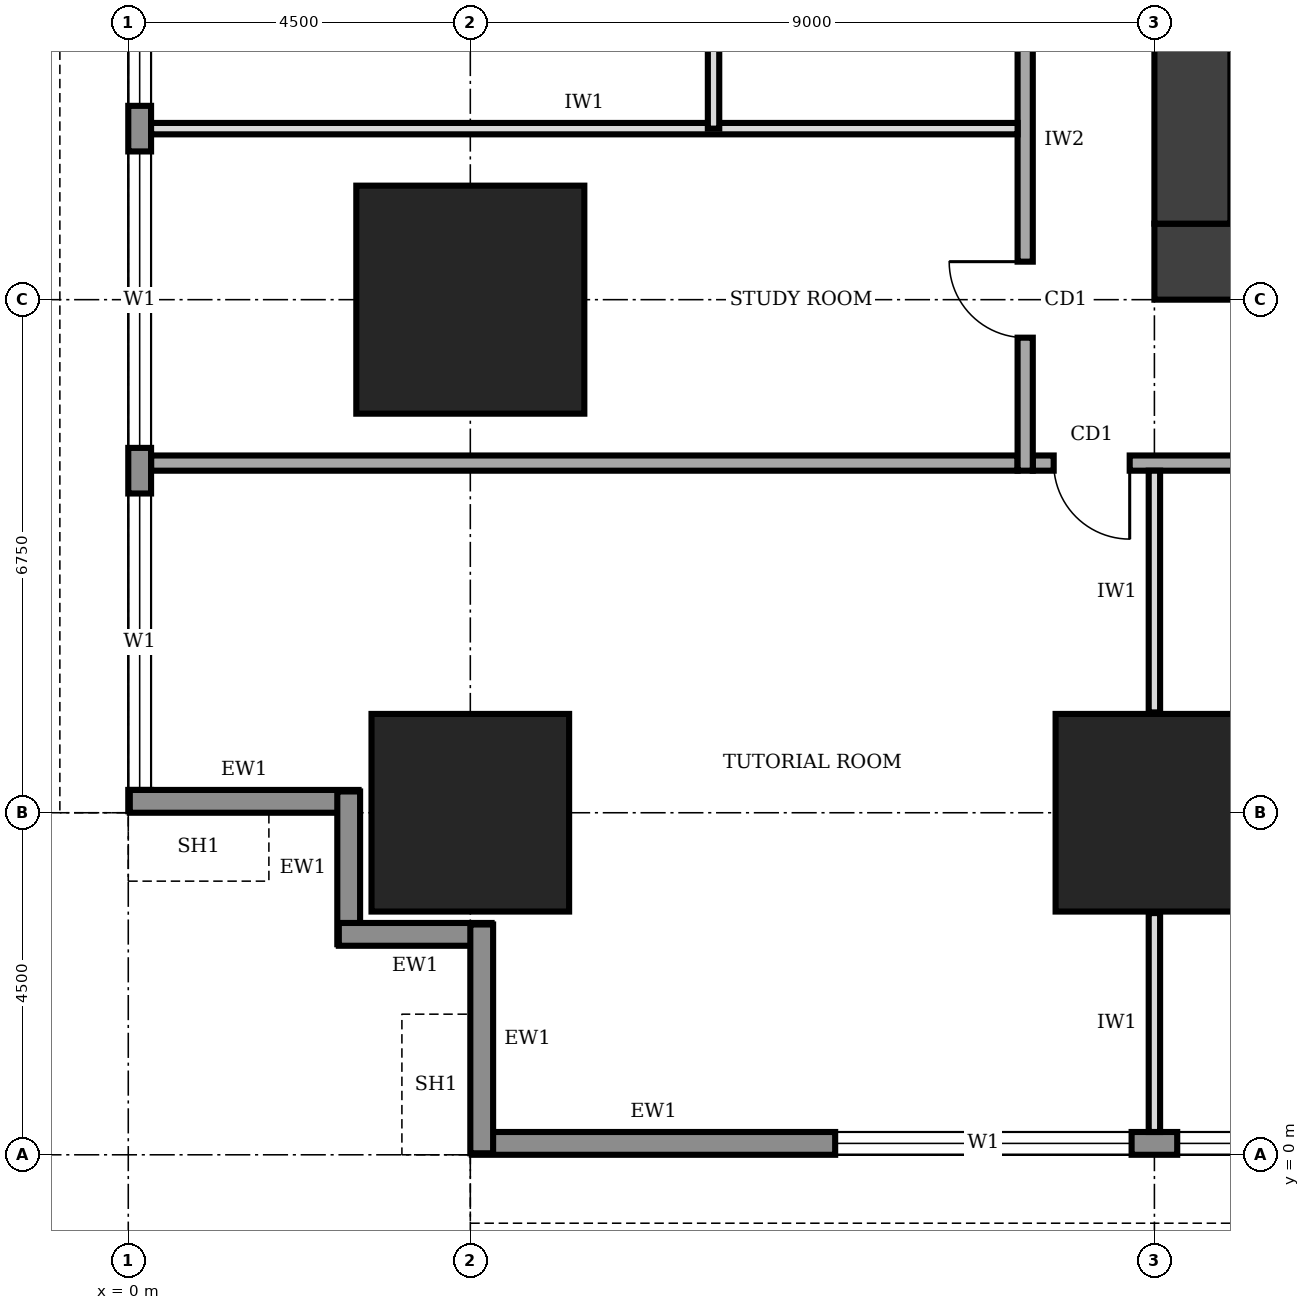
"""IFC4 building model, lengths in metres.
Left out: names, types, materials, properties, quantities, classifications, styles, units other than length and angle.
Written with IfcOpenShell. Run it as: python <this file> out.ifc"""

import sys

from ifc_helpers import new_model, si_unit, direction, frame, frame_2d, origin, origin_2d, place, context, subcontext, project, spatial, rectangle, extrude, element, fill, save


model = new_model("IFC4")
c1 = context("Model", 3, precision=1e-05, world=origin(), true_north=direction((0.0, 1.0)))
c2 = subcontext(c1, "Body", "Model", "MODEL_VIEW")
j1 = project(units=[si_unit("LENGTHUNIT", "METRE"), si_unit("PLANEANGLEUNIT", "RADIAN")], contexts=[c1])
p1 = place(None, origin())
s1 = spatial("IfcSite", under=j1, at=p1, CompositionType="ELEMENT")
p2 = place(p1, origin())
s2 = spatial("IfcBuilding", under=s1, at=p2, CompositionType="ELEMENT")
p3 = place(p2, frame((0.0, 0.0, 37.0)))
s3 = spatial("IfcBuildingStorey", under=s2, at=p3, CompositionType="ELEMENT", Elevation=37.0)
p4 = place(p3, frame((13.5, 11.75, 0.0), z_axis=(0.0, 0.0, 1.0), x_axis=(1.0, 0.0, 0.0)))
e1 = element("IfcWall", 1, at=p4, inside=s3, PredefinedType="SHEAR", context=c2, shape_type="SweptSolid", body=[
    extrude(rectangle(XDim=13.5, YDim=1.0, at=frame_2d((6.75, 0.0))), origin(), (0.0, 0.0, 1.0), 4.0),
])
p5 = place(p4, frame((4.75, 0.0, 0.0)))
e2 = element("IfcOpeningElement", 2, at=p5, cuts=e1, PredefinedType="OPENING", context=c2, shape_type="SweptSolid", body=[
    extrude(rectangle(XDim=1.0, YDim=2.1, at=frame_2d((0.5, 1.05))), frame((0.0, 0.51, 0.0), z_axis=(0.0, -1.0, 0.0), x_axis=(1.0, 0.0, 0.0)), (0.0, 0.0, 1.0), 1.02),
])
p6 = place(p3, frame((14.0, 28.25, 0.0), z_axis=(0.0, 0.0, 1.0), x_axis=(0.0, -1.0, 0.0)))
e3 = element("IfcWall", 3, at=p6, inside=s3, PredefinedType="SHEAR", context=c2, shape_type="SweptSolid", body=[
    extrude(rectangle(XDim=16.0, YDim=1.0, at=frame_2d((8.0, 0.0))), origin(), (0.0, 0.0, 1.0), 4.0),
])
for number, where, z_axis, x_axis in (
    (4, (4.5, 4.5, 0.0), (0.0, 0.0, 1.0), (1.0, 0.0, 0.0)),
    (5, (13.5, 4.5, 0.0), (0.0, 0.0, 1.0), (1.0, 0.0, 0.0)),
):
    element("IfcColumn", number, at=place(p3, frame(where, z_axis=z_axis, x_axis=x_axis)), inside=s3, PredefinedType="COLUMN", context=c2, shape_type="SweptSolid", body=[
        extrude(rectangle(XDim=2.6, YDim=2.6, at=origin_2d()), origin(), (0.0, 0.0, 1.0), 4.0),
    ])
p7 = place(p3, frame((4.5, 11.25, 0.0), z_axis=(0.0, 0.0, 1.0), x_axis=(1.0, 0.0, 0.0)))
e6 = element("IfcColumn", 6, at=p7, inside=s3, PredefinedType="COLUMN", context=c2, shape_type="SweptSolid", body=[
    extrude(rectangle(XDim=3.0, YDim=3.0, at=origin_2d()), origin(), (0.0, 0.0, 1.0), 4.0),
])
p8 = place(p3, frame((4.52, 0.15, 0.0), z_axis=(0.0, 0.0, 1.0), x_axis=(1.0, 0.0, 0.0)))
e7 = element("IfcWall", 7, at=p8, inside=s3, PredefinedType="STANDARD", context=c2, shape_type="SweptSolid", body=[
    extrude(rectangle(XDim=31.46, YDim=0.3, at=frame_2d((15.73, 0.0))), origin(), (0.0, 0.0, 1.0), 3.75),
])
p9 = place(p8, frame((4.78, 0.0, 0.9)))
e8 = element("IfcOpeningElement", 8, at=p9, cuts=e7, PredefinedType="OPENING", context=c2, shape_type="SweptSolid", body=[
    extrude(rectangle(XDim=3.9, YDim=2.2, at=frame_2d((1.95, 1.1))), frame((0.0, 0.16, 0.0), z_axis=(0.0, -1.0, 0.0), x_axis=(1.0, 0.0, 0.0)), (0.0, 0.0, 1.0), 0.32),
])
p10 = place(p8, frame((9.28, 0.0, 0.9)))
e9 = element("IfcOpeningElement", 9, at=p10, cuts=e7, PredefinedType="OPENING", context=c2, shape_type="SweptSolid", body=[
    extrude(rectangle(XDim=3.9, YDim=2.2, at=frame_2d((1.95, 1.1))), frame((0.0, 0.16, 0.0), z_axis=(0.0, -1.0, 0.0), x_axis=(1.0, 0.0, 0.0)), (0.0, 0.0, 1.0), 0.32),
])
p11 = place(p8, frame((13.78, 0.0, 0.9)))
e10 = element("IfcOpeningElement", 10, at=p11, cuts=e7, PredefinedType="OPENING", context=c2, shape_type="SweptSolid", body=[
    extrude(rectangle(XDim=3.9, YDim=2.2, at=frame_2d((1.95, 1.1))), frame((0.0, 0.16, 0.0), z_axis=(0.0, -1.0, 0.0), x_axis=(1.0, 0.0, 0.0)), (0.0, 0.0, 1.0), 0.32),
])
p12 = place(p8, frame((18.28, 0.0, 0.9)))
e11 = element("IfcOpeningElement", 11, at=p12, cuts=e7, PredefinedType="OPENING", context=c2, shape_type="SweptSolid", body=[
    extrude(rectangle(XDim=3.9, YDim=2.2, at=frame_2d((1.95, 1.1))), frame((0.0, 0.16, 0.0), z_axis=(0.0, -1.0, 0.0), x_axis=(1.0, 0.0, 0.0)), (0.0, 0.0, 1.0), 0.32),
])
p13 = place(p8, frame((22.78, 0.0, 0.9)))
e12 = element("IfcOpeningElement", 12, at=p13, cuts=e7, PredefinedType="OPENING", context=c2, shape_type="SweptSolid", body=[
    extrude(rectangle(XDim=3.9, YDim=2.2, at=frame_2d((1.95, 1.1))), frame((0.0, 0.16, 0.0), z_axis=(0.0, -1.0, 0.0), x_axis=(1.0, 0.0, 0.0)), (0.0, 0.0, 1.0), 0.32),
])
p14 = place(p8, frame((27.28, 0.0, 0.9)))
e13 = element("IfcOpeningElement", 13, at=p14, cuts=e7, PredefinedType="OPENING", context=c2, shape_type="SweptSolid", body=[
    extrude(rectangle(XDim=3.9, YDim=2.2, at=frame_2d((1.95, 1.1))), frame((0.0, 0.16, 0.0), z_axis=(0.0, -1.0, 0.0), x_axis=(1.0, 0.0, 0.0)), (0.0, 0.0, 1.0), 0.32),
])
p15 = place(p3, frame((0.15, 35.98, 0.0), z_axis=(0.0, 0.0, 1.0), x_axis=(0.0, -1.0, 0.0)))
e14 = element("IfcWall", 14, at=p15, inside=s3, PredefinedType="STANDARD", context=c2, shape_type="SweptSolid", body=[
    extrude(rectangle(XDim=31.46, YDim=0.3, at=frame_2d((15.73, 0.0))), origin(), (0.0, 0.0, 1.0), 3.75),
])
p16 = place(p15, frame((27.28, 0.0, 0.9)))
e15 = element("IfcOpeningElement", 15, at=p16, cuts=e14, PredefinedType="OPENING", context=c2, shape_type="SweptSolid", body=[
    extrude(rectangle(XDim=3.9, YDim=2.2, at=frame_2d((1.95, 1.1))), frame((0.0, 0.16, 0.0), z_axis=(0.0, -1.0, 0.0), x_axis=(1.0, 0.0, 0.0)), (0.0, 0.0, 1.0), 0.32),
])
p17 = place(p15, frame((22.78, 0.0, 0.9)))
e16 = element("IfcOpeningElement", 16, at=p17, cuts=e14, PredefinedType="OPENING", context=c2, shape_type="SweptSolid", body=[
    extrude(rectangle(XDim=3.9, YDim=2.2, at=frame_2d((1.95, 1.1))), frame((0.0, 0.16, 0.0), z_axis=(0.0, -1.0, 0.0), x_axis=(1.0, 0.0, 0.0)), (0.0, 0.0, 1.0), 0.32),
])
p18 = place(p15, frame((18.28, 0.0, 0.9)))
e17 = element("IfcOpeningElement", 17, at=p18, cuts=e14, PredefinedType="OPENING", context=c2, shape_type="SweptSolid", body=[
    extrude(rectangle(XDim=3.9, YDim=2.2, at=frame_2d((1.95, 1.1))), frame((0.0, 0.16, 0.0), z_axis=(0.0, -1.0, 0.0), x_axis=(1.0, 0.0, 0.0)), (0.0, 0.0, 1.0), 0.32),
])
p19 = place(p15, frame((13.78, 0.0, 0.9)))
e18 = element("IfcOpeningElement", 18, at=p19, cuts=e14, PredefinedType="OPENING", context=c2, shape_type="SweptSolid", body=[
    extrude(rectangle(XDim=3.9, YDim=2.2, at=frame_2d((1.95, 1.1))), frame((0.0, 0.16, 0.0), z_axis=(0.0, -1.0, 0.0), x_axis=(1.0, 0.0, 0.0)), (0.0, 0.0, 1.0), 0.32),
])
p20 = place(p15, frame((9.28, 0.0, 0.9)))
e19 = element("IfcOpeningElement", 19, at=p20, cuts=e14, PredefinedType="OPENING", context=c2, shape_type="SweptSolid", body=[
    extrude(rectangle(XDim=3.9, YDim=2.2, at=frame_2d((1.95, 1.1))), frame((0.0, 0.16, 0.0), z_axis=(0.0, -1.0, 0.0), x_axis=(1.0, 0.0, 0.0)), (0.0, 0.0, 1.0), 0.32),
])
p21 = place(p15, frame((4.78, 0.0, 0.9)))
e20 = element("IfcOpeningElement", 20, at=p21, cuts=e14, PredefinedType="OPENING", context=c2, shape_type="SweptSolid", body=[
    extrude(rectangle(XDim=3.9, YDim=2.2, at=frame_2d((1.95, 1.1))), frame((0.0, 0.16, 0.0), z_axis=(0.0, -1.0, 0.0), x_axis=(1.0, 0.0, 0.0)), (0.0, 0.0, 1.0), 0.32),
])
p22 = place(p3, frame((0.02, 4.65, 0.0), z_axis=(0.0, 0.0, 1.0), x_axis=(1.0, 0.0, 0.0)))
e21 = element("IfcWall", 21, at=p22, inside=s3, PredefinedType="STANDARD", context=c2, shape_type="SweptSolid", body=[
    extrude(rectangle(XDim=3.01, YDim=0.3, at=frame_2d((1.505, 0.0))), origin(), (0.0, 0.0, 1.0), 2.85),
])
for number, where, z_axis, x_axis in (
    (22, (2.9, 4.78, 0.0), (0.0, 0.0, 1.0), (0.0, -1.0, 0.0)),
    (23, (2.77, 2.9, 0.0), (0.0, 0.0, 1.0), (1.0, 0.0, 0.0)),
):
    element("IfcWall", number, at=place(p3, frame(where, z_axis=z_axis, x_axis=x_axis)), inside=s3, PredefinedType="STANDARD", context=c2, shape_type="SweptSolid", body=[
        extrude(rectangle(XDim=2.01, YDim=0.3, at=frame_2d((1.005, 0.0))), origin(), (0.0, 0.0, 1.0), 3.75),
    ])
p23 = place(p3, frame((4.65, 3.03, 0.0), z_axis=(0.0, 0.0, 1.0), x_axis=(0.0, -1.0, 0.0)))
e24 = element("IfcWall", 24, at=p23, inside=s3, PredefinedType="STANDARD", context=c2, shape_type="SweptSolid", body=[
    extrude(rectangle(XDim=3.01, YDim=0.3, at=frame_2d((1.505, 0.0))), origin(), (0.0, 0.0, 1.0), 2.85),
])
p24 = place(p3, frame((11.9, 9.1, 0.0), z_axis=(0.0, 0.0, 1.0), x_axis=(1.0, 0.0, 0.0)))
e25 = element("IfcWall", 25, at=p24, inside=s3, PredefinedType="SOLIDWALL", context=c2, shape_type="SweptSolid", body=[
    extrude(rectangle(XDim=18.4, YDim=0.2, at=frame_2d((9.2, 0.0))), origin(), (0.0, 0.0, 1.0), 3.75),
])
p25 = place(p24, frame((0.275, 0.0, 0.0)))
e26 = element("IfcOpeningElement", 26, at=p25, cuts=e25, PredefinedType="OPENING", context=c2, shape_type="SweptSolid", body=[
    extrude(rectangle(XDim=1.0, YDim=2.1, at=frame_2d((0.5, 1.05))), frame((0.0, 0.11, 0.0), z_axis=(0.0, -1.0, 0.0), x_axis=(1.0, 0.0, 0.0)), (0.0, 0.0, 1.0), 0.22),
])
p26 = place(p24, frame((3.35, 0.0, 0.0)))
e27 = element("IfcOpeningElement", 27, at=p26, cuts=e25, PredefinedType="OPENING", context=c2, shape_type="SweptSolid", body=[
    extrude(rectangle(XDim=1.0, YDim=2.1, at=frame_2d((0.5, 1.05))), frame((0.0, 0.11, 0.0), z_axis=(0.0, -1.0, 0.0), x_axis=(1.0, 0.0, 0.0)), (0.0, 0.0, 1.0), 0.22),
])
p27 = place(p24, frame((10.1, 0.0, 0.0)))
e28 = element("IfcOpeningElement", 28, at=p27, cuts=e25, PredefinedType="OPENING", context=c2, shape_type="SweptSolid", body=[
    extrude(rectangle(XDim=1.0, YDim=2.1, at=frame_2d((0.5, 1.05))), frame((0.0, 0.11, 0.0), z_axis=(0.0, -1.0, 0.0), x_axis=(1.0, 0.0, 0.0)), (0.0, 0.0, 1.0), 0.22),
])
p28 = place(p24, frame((15.85, 0.0, 0.0)))
e29 = element("IfcOpeningElement", 29, at=p28, cuts=e25, PredefinedType="OPENING", context=c2, shape_type="SweptSolid", body=[
    extrude(rectangle(XDim=1.8, YDim=2.1, at=frame_2d((0.9, 1.05))), frame((0.0, 0.11, 0.0), z_axis=(0.0, -1.0, 0.0), x_axis=(1.0, 0.0, 0.0)), (0.0, 0.0, 1.0), 0.22),
])
p29 = place(p3, frame((11.8, 31.3, 0.0), z_axis=(0.0, 0.0, 1.0), x_axis=(0.0, -1.0, 0.0)))
e30 = element("IfcWall", 30, at=p29, inside=s3, PredefinedType="SOLIDWALL", context=c2, shape_type="SweptSolid", body=[
    extrude(rectangle(XDim=22.3, YDim=0.2, at=frame_2d((11.15, 0.0))), origin(), (0.0, 0.0, 1.0), 3.75),
])
p30 = place(p29, frame((19.55, 0.0, 0.0)))
e31 = element("IfcOpeningElement", 31, at=p30, cuts=e30, PredefinedType="OPENING", context=c2, shape_type="SweptSolid", body=[
    extrude(rectangle(XDim=1.0, YDim=2.1, at=frame_2d((0.5, 1.05))), frame((0.0, 0.11, 0.0), z_axis=(0.0, -1.0, 0.0), x_axis=(1.0, 0.0, 0.0)), (0.0, 0.0, 1.0), 0.22),
])
p31 = place(p29, frame((15.45, 0.0, 0.0)))
e32 = element("IfcOpeningElement", 32, at=p31, cuts=e30, PredefinedType="OPENING", context=c2, shape_type="SweptSolid", body=[
    extrude(rectangle(XDim=0.9, YDim=2.1, at=frame_2d((0.45, 1.05))), frame((0.0, 0.11, 0.0), z_axis=(0.0, -1.0, 0.0), x_axis=(1.0, 0.0, 0.0)), (0.0, 0.0, 1.0), 0.22),
])
p32 = place(p29, frame((12.45, 0.0, 0.0)))
e33 = element("IfcOpeningElement", 33, at=p32, cuts=e30, PredefinedType="OPENING", context=c2, shape_type="SweptSolid", body=[
    extrude(rectangle(XDim=0.9, YDim=2.1, at=frame_2d((0.45, 1.05))), frame((0.0, 0.11, 0.0), z_axis=(0.0, -1.0, 0.0), x_axis=(1.0, 0.0, 0.0)), (0.0, 0.0, 1.0), 0.22),
])
p33 = place(p29, frame((7.6, 0.0, 0.0)))
e34 = element("IfcOpeningElement", 34, at=p33, cuts=e30, PredefinedType="OPENING", context=c2, shape_type="SweptSolid", body=[
    extrude(rectangle(XDim=0.9, YDim=2.1, at=frame_2d((0.45, 1.05))), frame((0.0, 0.11, 0.0), z_axis=(0.0, -1.0, 0.0), x_axis=(1.0, 0.0, 0.0)), (0.0, 0.0, 1.0), 0.22),
])
p34 = place(p29, frame((4.8, 0.0, 0.0)))
e35 = element("IfcOpeningElement", 35, at=p34, cuts=e30, PredefinedType="OPENING", context=c2, shape_type="SweptSolid", body=[
    extrude(rectangle(XDim=1.0, YDim=2.1, at=frame_2d((0.5, 1.05))), frame((0.0, 0.11, 0.0), z_axis=(0.0, -1.0, 0.0), x_axis=(1.0, 0.0, 0.0)), (0.0, 0.0, 1.0), 0.22),
])
p35 = place(p29, frame((10.3, 0.0, 0.0)))
e36 = element("IfcOpeningElement", 36, at=p35, cuts=e30, PredefinedType="OPENING", context=c2, shape_type="SweptSolid", body=[
    extrude(rectangle(XDim=1.0, YDim=2.1, at=frame_2d((0.5, 1.05))), frame((0.0, 0.11, 0.0), z_axis=(0.0, -1.0, 0.0), x_axis=(1.0, 0.0, 0.0)), (0.0, 0.0, 1.0), 0.22),
])
p36 = place(p29, frame((1.55, 0.0, 0.0)))
e37 = element("IfcOpeningElement", 37, at=p36, cuts=e30, PredefinedType="OPENING", context=c2, shape_type="SweptSolid", body=[
    extrude(rectangle(XDim=1.0, YDim=2.1, at=frame_2d((0.5, 1.05))), frame((0.0, 0.11, 0.0), z_axis=(0.0, -1.0, 0.0), x_axis=(1.0, 0.0, 0.0)), (0.0, 0.0, 1.0), 0.22),
])
p37 = place(p3, frame((0.3, 9.1, 0.0), z_axis=(0.0, 0.0, 1.0), x_axis=(1.0, 0.0, 0.0)))
e38 = element("IfcWall", 38, at=p37, inside=s3, PredefinedType="SOLIDWALL", context=c2, shape_type="SweptSolid", body=[
    extrude(rectangle(XDim=11.4, YDim=0.2, at=frame_2d((5.7, 0.0))), origin(), (0.0, 0.0, 1.0), 3.75),
])
p38 = place(p3, frame((13.5, 0.3, 0.0), z_axis=(0.0, 0.0, 1.0), x_axis=(0.0, 1.0, 0.0)))
e39 = element("IfcWall", 39, at=p38, inside=s3, PredefinedType="PARTITIONING", context=c2, shape_type="SweptSolid", body=[
    extrude(rectangle(XDim=2.88, YDim=0.15, at=frame_2d((1.44, 0.0))), origin(), (0.0, 0.0, 1.0), 2.85),
])
p39 = place(p3, frame((13.5, 5.82, 0.0), z_axis=(0.0, 0.0, 1.0), x_axis=(0.0, 1.0, 0.0)))
e40 = element("IfcWall", 40, at=p39, inside=s3, PredefinedType="PARTITIONING", context=c2, shape_type="SweptSolid", body=[
    extrude(rectangle(XDim=3.18, YDim=0.15, at=frame_2d((1.59, 0.0))), origin(), (0.0, 0.0, 1.0), 2.85),
])
p40 = place(p3, frame((0.3, 13.5, 0.0), z_axis=(0.0, 0.0, 1.0), x_axis=(1.0, 0.0, 0.0)))
e41 = element("IfcWall", 41, at=p40, inside=s3, PredefinedType="PARTITIONING", context=c2, shape_type="SweptSolid", body=[
    extrude(rectangle(XDim=11.4, YDim=0.15, at=frame_2d((5.7, 0.0))), origin(), (0.0, 0.0, 1.0), 3.75),
])
p41 = place(p3, frame((7.7, 13.5, 0.0), z_axis=(0.0, 0.0, 1.0), x_axis=(0.0, 1.0, 0.0)))
e42 = element("IfcWall", 42, at=p41, inside=s3, PredefinedType="PARTITIONING", context=c2, shape_type="SweptSolid", body=[
    extrude(rectangle(XDim=3.8, YDim=0.15, at=frame_2d((1.9, 0.0))), origin(), (0.0, 0.0, 1.0), 3.75),
])
p42 = place(p9, origin())
e43 = element("IfcWindow", 43, at=p42, inside=s3, PartitioningType="SINGLE_PANEL", PredefinedType="WINDOW", context=c2, shape_type="SweptSolid", body=[
    extrude(rectangle(XDim=3.9, YDim=2.2, at=frame_2d((1.95, 1.1))), frame((0.0, 0.03, 0.0), z_axis=(0.0, -1.0, 0.0), x_axis=(1.0, 0.0, 0.0)), (0.0, 0.0, 1.0), 0.06),
])
fill(e8, e43)
p43 = place(p10, origin())
e44 = element("IfcWindow", 44, at=p43, inside=s3, PartitioningType="SINGLE_PANEL", PredefinedType="WINDOW", context=c2, shape_type="SweptSolid", body=[
    extrude(rectangle(XDim=3.9, YDim=2.2, at=frame_2d((1.95, 1.1))), frame((0.0, 0.03, 0.0), z_axis=(0.0, -1.0, 0.0), x_axis=(1.0, 0.0, 0.0)), (0.0, 0.0, 1.0), 0.06),
])
fill(e9, e44)
p44 = place(p16, origin())
e45 = element("IfcWindow", 45, at=p44, inside=s3, PartitioningType="SINGLE_PANEL", PredefinedType="WINDOW", context=c2, shape_type="SweptSolid", body=[
    extrude(rectangle(XDim=3.9, YDim=2.2, at=frame_2d((1.95, 1.1))), frame((0.0, 0.03, 0.0), z_axis=(0.0, -1.0, 0.0), x_axis=(1.0, 0.0, 0.0)), (0.0, 0.0, 1.0), 0.06),
])
fill(e15, e45)
p45 = place(p17, origin())
e46 = element("IfcWindow", 46, at=p45, inside=s3, PartitioningType="SINGLE_PANEL", PredefinedType="WINDOW", context=c2, shape_type="SweptSolid", body=[
    extrude(rectangle(XDim=3.9, YDim=2.2, at=frame_2d((1.95, 1.1))), frame((0.0, 0.03, 0.0), z_axis=(0.0, -1.0, 0.0), x_axis=(1.0, 0.0, 0.0)), (0.0, 0.0, 1.0), 0.06),
])
fill(e16, e46)
p46 = place(p18, origin())
e47 = element("IfcWindow", 47, at=p46, inside=s3, PartitioningType="SINGLE_PANEL", PredefinedType="WINDOW", context=c2, shape_type="SweptSolid", body=[
    extrude(rectangle(XDim=3.9, YDim=2.2, at=frame_2d((1.95, 1.1))), frame((0.0, 0.03, 0.0), z_axis=(0.0, -1.0, 0.0), x_axis=(1.0, 0.0, 0.0)), (0.0, 0.0, 1.0), 0.06),
])
fill(e17, e47)
p47 = place(p25, frame((1.0, 0.0, 0.0), z_axis=(0.0, 0.0, 1.0), x_axis=(-1.0, 0.0, 0.0)))
e48 = element("IfcDoor", 48, at=p47, inside=s3, OperationType="SINGLE_SWING_LEFT", PredefinedType="DOOR", context=c2, shape_type="SweptSolid", body=[
    extrude(rectangle(XDim=1.0, YDim=2.1, at=frame_2d((0.5, 1.05))), frame((0.0, 0.025, 0.0), z_axis=(0.0, -1.0, 0.0), x_axis=(1.0, 0.0, 0.0)), (0.0, 0.0, 1.0), 0.05),
])
fill(e26, e48)
p48 = place(p30, frame((1.0, 0.0, 0.0), z_axis=(0.0, 0.0, 1.0), x_axis=(-1.0, 0.0, 0.0)))
e49 = element("IfcDoor", 49, at=p48, inside=s3, OperationType="SINGLE_SWING_RIGHT", PredefinedType="DOOR", context=c2, shape_type="SweptSolid", body=[
    extrude(rectangle(XDim=1.0, YDim=2.1, at=frame_2d((0.5, 1.05))), frame((0.0, 0.025, 0.0), z_axis=(0.0, -1.0, 0.0), x_axis=(1.0, 0.0, 0.0)), (0.0, 0.0, 1.0), 0.05),
])
fill(e31, e49)
save(model, sys.argv[1])
